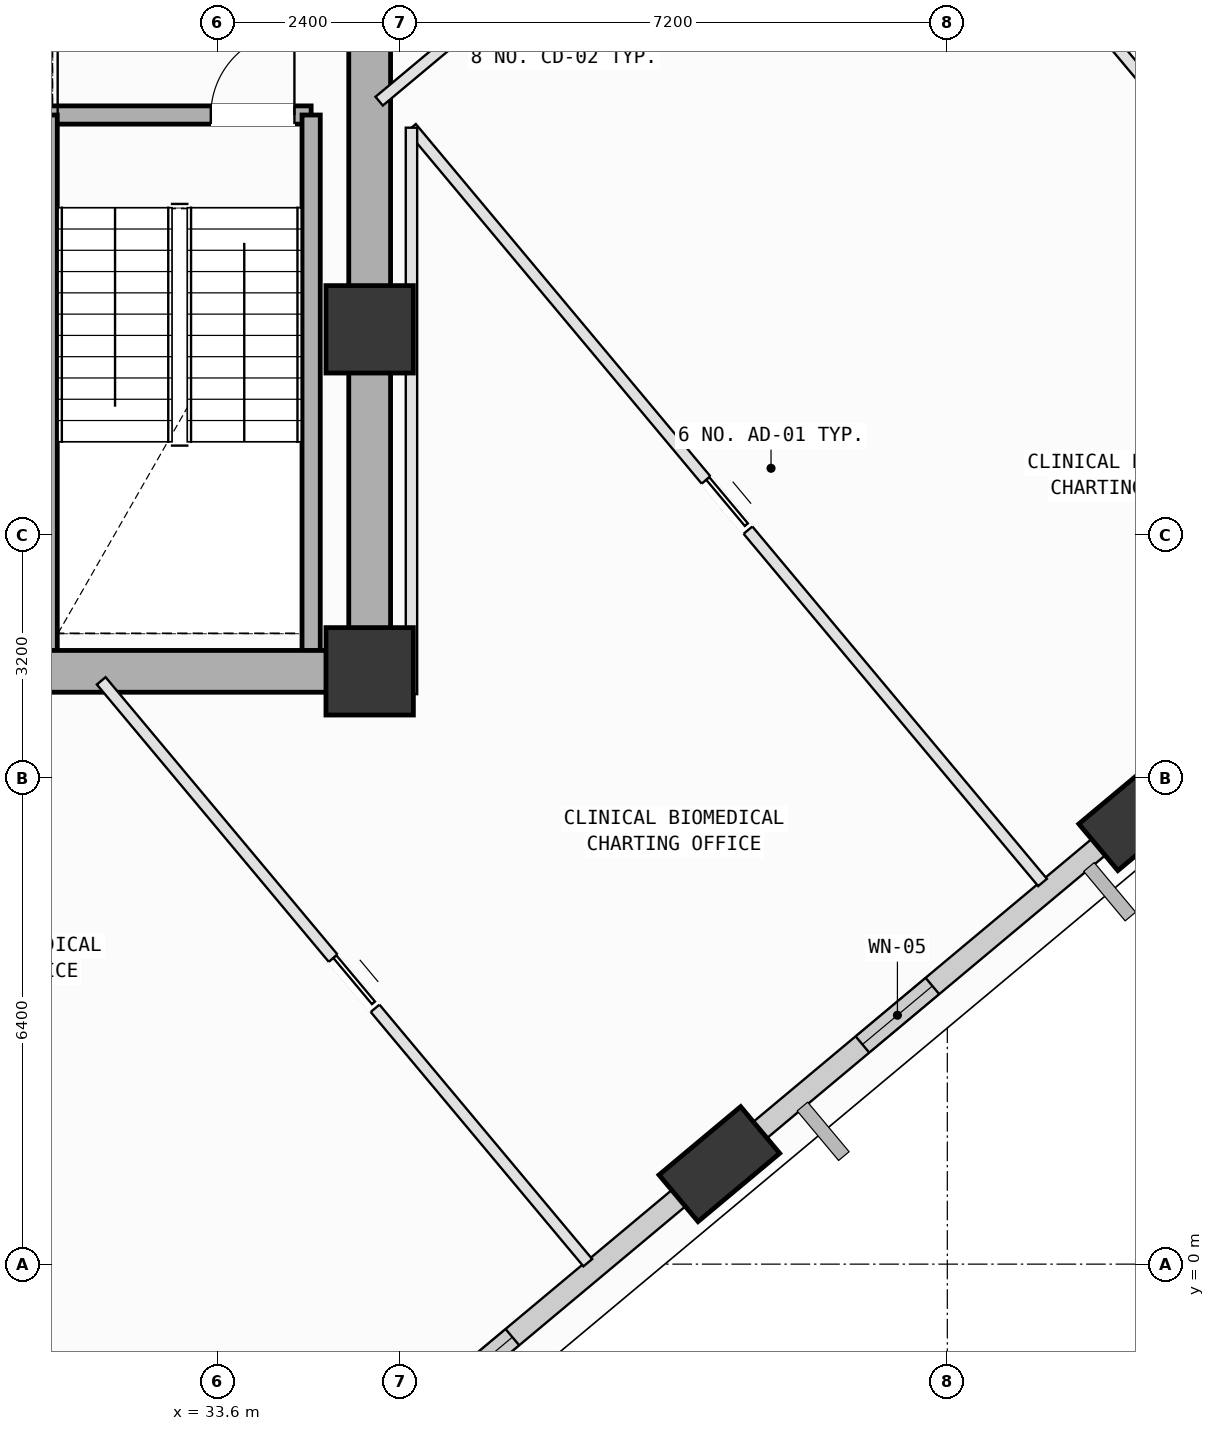
"""IFC4 building model, lengths in metres.
Left out: names, types, materials, properties, quantities, classifications, styles, units other than length and angle.
Written with IfcOpenShell. Run it as: python <this file> out.ifc"""

import sys

from ifc_helpers import new_model, si_unit, direction, frame, frame_2d, origin, origin_2d, place, context, subcontext, project, spatial, rectangle, extrude, element, fill, save


model = new_model("IFC4")
c1 = context("Model", 3, precision=1e-05, world=origin(), true_north=direction((0.0, 1.0)))
c2 = subcontext(c1, "Body", "Model", "MODEL_VIEW")
j1 = project(units=[si_unit("LENGTHUNIT", "METRE"), si_unit("PLANEANGLEUNIT", "RADIAN")], contexts=[c1])
p1 = place(None, origin())
s1 = spatial("IfcSite", under=j1, at=p1, CompositionType="ELEMENT")
p2 = place(p1, origin())
s2 = spatial("IfcBuilding", under=s1, at=p2, CompositionType="ELEMENT")
p3 = place(p2, frame((0.0, 0.0, 193.8)))
s3 = spatial("IfcBuildingStorey", under=s2, at=p3, CompositionType="ELEMENT", Elevation=193.8)
for number, where, z_axis, x_axis in (
    (1, (35.6, 7.8, 0.0), (0.0, 0.0, 1.0), (1.0, 0.0, 0.0)),
    (2, (35.6, 12.3, 0.0), (0.0, 0.0, 1.0), (1.0, 0.0, 0.0)),
):
    element("IfcColumn", number, at=place(p3, frame(where, z_axis=z_axis, x_axis=x_axis)), inside=s3, PredefinedType="COLUMN", context=c2, shape_type="SweptSolid", body=[
        extrude(rectangle(XDim=1.15, YDim=1.15, at=origin_2d()), origin(), (0.0, 0.0, 1.0), 4.0),
    ])
p4 = place(p3, frame((40.201, 1.316, 0.002), z_axis=(0.096641843147, 0.028020056409, 0.994924736144), x_axis=(-0.826582032204, 0.559103058849, 0.064543889124)))
e3 = element("IfcColumn", 3, at=p4, inside=s3, PredefinedType="COLUMN", context=c2, shape_type="SweptSolid", body=[
    extrude(rectangle(XDim=1.4, YDim=0.8, at=origin_2d()), origin(), (0.0, 0.0, 1.0), 4.017),
])
p5 = place(p3, frame((45.724, 5.935, 0.002), z_axis=(0.077435241864, 0.050670507834, 0.995708934857), x_axis=(-0.954505911001, 0.292223987972, 0.05935997573)))
e4 = element("IfcColumn", 4, at=p5, inside=s3, PredefinedType="COLUMN", context=c2, shape_type="SweptSolid", body=[
    extrude(rectangle(XDim=1.4, YDim=0.8, at=origin_2d()), origin(), (0.0, 0.0, 1.0), 4.014),
])
p6 = place(p3, frame((39.967, 1.121, 0.0), z_axis=(0.0, 0.0, 1.0), x_axis=(-0.767160959211, -0.641454645834, 0.0)))
e5 = element("IfcWall", 5, at=p6, inside=s3, PredefinedType="SOLIDWALL", context=c2, shape_type="SweptSolid", body=[
    extrude(rectangle(XDim=6.234, YDim=0.28, at=frame_2d((3.117, 0.0))), origin(), (0.0, 0.0, 1.0), 3.265),
])
p7 = place(p6, frame((3.245, 0.0, 0.75)))
e6 = element("IfcOpeningElement", 6, at=p7, cuts=e5, PredefinedType="OPENING", context=c2, shape_type="SweptSolid", body=[
    extrude(rectangle(XDim=1.8, YDim=2.05, at=frame_2d((0.9, 1.025))), frame((0.0, 0.15, 0.0), z_axis=(0.0, -1.0, 0.0), x_axis=(1.0, 0.0, 0.0)), (0.0, 0.0, 1.0), 0.3),
])
p8 = place(p3, frame((45.486, 5.735, 0.0), z_axis=(0.0, 0.0, 1.0), x_axis=(-0.767147873107, -0.641470296107, 0.0)))
e7 = element("IfcWall", 7, at=p8, inside=s3, PredefinedType="SOLIDWALL", context=c2, shape_type="SweptSolid", body=[
    extrude(rectangle(XDim=6.214, YDim=0.28, at=frame_2d((3.107, 0.0))), origin(), (0.0, 0.0, 1.0), 3.265),
])
p9 = place(p8, frame((3.235, 0.0, 0.75)))
e8 = element("IfcOpeningElement", 8, at=p9, cuts=e7, PredefinedType="OPENING", context=c2, shape_type="SweptSolid", body=[
    extrude(rectangle(XDim=1.2, YDim=1.75, at=frame_2d((0.6, 0.875))), frame((0.0, 0.15, 0.0), z_axis=(0.0, -1.0, 0.0), x_axis=(1.0, 0.0, 0.0)), (0.0, 0.0, 1.0), 0.3),
])
p10 = place(p3, frame((31.37, 15.12, 0.0), z_axis=(0.0, 0.0, 1.0), x_axis=(1.0, 0.0, 0.0)))
e9 = element("IfcWall", 9, at=p10, inside=s3, PredefinedType="SOLIDWALL", context=c2, shape_type="SweptSolid", body=[
    extrude(rectangle(XDim=3.46, YDim=0.24, at=frame_2d((1.73, 0.0))), origin(), (0.0, 0.0, 1.0), 3.78),
])
p11 = place(p10, frame((2.14, 0.0, 0.0)))
e10 = element("IfcOpeningElement", 10, at=p11, cuts=e9, PredefinedType="OPENING", context=c2, shape_type="SweptSolid", body=[
    extrude(rectangle(XDim=1.1, YDim=2.15, at=frame_2d((0.55, 1.075))), frame((0.0, 0.13, 0.0), z_axis=(0.0, -1.0, 0.0), x_axis=(1.0, 0.0, 0.0)), (0.0, 0.0, 1.0), 0.26),
])
for number, where, z_axis, x_axis in (
    (11, (34.83, 15.12, 0.0), (0.0, 0.0, 1.0), (0.0, -1.0, 0.0)),
    (12, (31.37, 8.075, 0.0), (0.0, 0.0, 1.0), (0.0, 1.0, 0.0)),
):
    element("IfcWall", number, at=place(p3, frame(where, z_axis=z_axis, x_axis=x_axis)), inside=s3, PredefinedType="SOLIDWALL", context=c2, shape_type="SweptSolid", body=[
        extrude(rectangle(XDim=7.045, YDim=0.24, at=frame_2d((3.522, 0.0))), origin(), (0.0, 0.0, 1.0), 3.78),
    ])
p12 = place(p3, frame((24.8, 7.8, 0.0), z_axis=(0.0, 0.0, 1.0), x_axis=(1.0, 0.0, 0.0)))
e13 = element("IfcWall", 13, at=p12, inside=s3, PredefinedType="SHEAR", context=c2, shape_type="SweptSolid", body=[
    extrude(rectangle(XDim=10.8, YDim=0.55, at=frame_2d((5.4, 0.0))), origin(), (0.0, 0.0, 1.0), 3.78),
])
p13 = place(p3, frame((35.6, 7.8, 0.0), z_axis=(0.0, 0.0, 1.0), x_axis=(0.0, 1.0, 0.0)))
e14 = element("IfcWall", 14, at=p13, inside=s3, PredefinedType="SHEAR", context=c2, shape_type="SweptSolid", body=[
    extrude(rectangle(XDim=9.0, YDim=0.55, at=frame_2d((4.5, 0.0))), origin(), (0.0, 0.0, 1.0), 3.78),
])
p14 = place(p3, frame((23.836, 5.361, 0.0), z_axis=(0.0, 0.0, 1.0), x_axis=(0.641422910141, -0.767187493606, 0.0)))
e15 = element("IfcWall", 15, at=p14, inside=s3, PredefinedType="PARTITIONING", context=c2, shape_type="SweptSolid", body=[
    extrude(rectangle(XDim=13.486, YDim=0.15, at=frame_2d((6.743, 0.0))), origin(), (0.0, 0.0, 1.0), 3.78),
])
p15 = place(p14, frame((6.313, 0.0, 0.0)))
e16 = element("IfcOpeningElement", 16, at=p15, cuts=e15, PredefinedType="OPENING", context=c2, shape_type="SweptSolid", body=[
    extrude(rectangle(XDim=0.86, YDim=2.06, at=frame_2d((0.43, 1.03))), frame((0.0, 0.085, 0.0), z_axis=(0.0, -1.0, 0.0), x_axis=(1.0, 0.0, 0.0)), (0.0, 0.0, 1.0), 0.17),
])
p16 = place(p3, frame((32.068, 7.675, 0.0), z_axis=(0.0, 0.0, 1.0), x_axis=(0.641475635529, -0.767143408381, 0.0)))
e17 = element("IfcWall", 17, at=p16, inside=s3, PredefinedType="PARTITIONING", context=c2, shape_type="SweptSolid", body=[
    extrude(rectangle(XDim=9.98, YDim=0.15, at=frame_2d((4.99, 0.0))), origin(), (0.0, 0.0, 1.0), 3.78),
])
p17 = place(p16, frame((4.757, 0.0, 0.0)))
e18 = element("IfcOpeningElement", 18, at=p17, cuts=e17, PredefinedType="OPENING", context=c2, shape_type="SweptSolid", body=[
    extrude(rectangle(XDim=0.86, YDim=2.06, at=frame_2d((0.43, 1.03))), frame((0.0, 0.085, 0.0), z_axis=(0.0, -1.0, 0.0), x_axis=(1.0, 0.0, 0.0)), (0.0, 0.0, 1.0), 0.17),
])
p18 = place(p3, frame((36.15, 14.953, 0.0), z_axis=(0.0, 0.0, 1.0), x_axis=(0.641424642923, -0.767186044875, 0.0)))
e19 = element("IfcWall", 19, at=p18, inside=s3, PredefinedType="PARTITIONING", context=c2, shape_type="SweptSolid", body=[
    extrude(rectangle(XDim=12.945, YDim=0.15, at=frame_2d((6.472, 0.0))), origin(), (0.0, 0.0, 1.0), 3.78),
])
p19 = place(p18, frame((6.042, 0.0, 0.0)))
e20 = element("IfcOpeningElement", 20, at=p19, cuts=e19, PredefinedType="OPENING", context=c2, shape_type="SweptSolid", body=[
    extrude(rectangle(XDim=0.86, YDim=2.06, at=frame_2d((0.43, 1.03))), frame((0.0, 0.085, 0.0), z_axis=(0.0, -1.0, 0.0), x_axis=(1.0, 0.0, 0.0)), (0.0, 0.0, 1.0), 0.17),
])
p20 = place(p3, frame((40.866, 1.572, 0.0), z_axis=(0.0, 0.0, 1.0), x_axis=(-0.767157200242, -0.641459141425, 0.0)))
e21 = element("IfcWall", 21, at=p20, inside=s3, PredefinedType="PARTITIONING", context=c2, shape_type="SweptSolid", body=[
    extrude(rectangle(XDim=0.979, YDim=0.15, at=frame_2d((0.49, 0.0))), origin(), (0.0, 0.0, 1.0), 3.265),
])
p21 = place(p3, frame((35.6, 7.5, 0.0), z_axis=(0.0, 0.0, 1.0), x_axis=(1.0, 0.0, 0.0)))
e22 = element("IfcWall", 22, at=p21, inside=s3, PredefinedType="PARTITIONING", context=c2, shape_type="SweptSolid", body=[
    extrude(rectangle(XDim=0.55, YDim=0.15, at=frame_2d((0.275, 0.0))), origin(), (0.0, 0.0, 1.0), 3.78),
])
p22 = place(p3, frame((36.15, 7.5, 0.0), z_axis=(0.0, 0.0, 1.0), x_axis=(0.0, 1.0, 0.0)))
e23 = element("IfcWall", 23, at=p22, inside=s3, PredefinedType="PARTITIONING", context=c2, shape_type="SweptSolid", body=[
    extrude(rectangle(XDim=7.453, YDim=0.15, at=frame_2d((3.727, 0.0))), origin(), (0.0, 0.0, 1.0), 3.78),
])
p23 = place(p3, frame((41.82, 20.333, 0.0), z_axis=(0.0, 0.0, 1.0), x_axis=(0.641441854708, -0.767171654213, 0.0)))
e24 = element("IfcWall", 24, at=p23, inside=s3, PredefinedType="PARTITIONING", context=c2, shape_type="SweptSolid", body=[
    extrude(rectangle(XDim=13.435, YDim=0.15, at=frame_2d((6.718, 0.0))), origin(), (0.0, 0.0, 1.0), 3.78),
])
p24 = place(p3, frame((46.394, 6.194, 0.0), z_axis=(0.0, 0.0, 1.0), x_axis=(-0.767312502054, -0.641273361518, 0.0)))
e25 = element("IfcWall", 25, at=p24, inside=s3, PredefinedType="PARTITIONING", context=c2, shape_type="SweptSolid", body=[
    extrude(rectangle(XDim=0.992, YDim=0.15, at=frame_2d((0.496, 0.0))), origin(), (0.0, 0.0, 1.0), 3.265),
])
p25 = place(p3, frame((35.725, 15.302, 0.0), z_axis=(0.0, 0.0, 1.0), x_axis=(0.767249700724, 0.641348498664, 0.0)))
e26 = element("IfcWall", 26, at=p25, inside=s3, PredefinedType="PARTITIONING", context=c2, shape_type="SweptSolid", body=[
    extrude(rectangle(XDim=4.082, YDim=0.15, at=frame_2d((2.041, 0.0))), origin(), (0.0, 0.0, 1.0), 3.78),
])
p26 = place(p25, frame((1.902, 0.0, 0.0)))
e27 = element("IfcOpeningElement", 27, at=p26, cuts=e26, PredefinedType="OPENING", context=c2, shape_type="SweptSolid", body=[
    extrude(rectangle(XDim=1.2, YDim=2.15, at=frame_2d((0.6, 1.075))), frame((0.0, 0.085, 0.0), z_axis=(0.0, -1.0, 0.0), x_axis=(1.0, 0.0, 0.0)), (0.0, 0.0, 1.0), 0.17),
])
p27 = place(p7, origin())
e28 = element("IfcWindow", 28, at=p27, inside=s3, PartitioningType="SINGLE_PANEL", PredefinedType="WINDOW", context=c2, shape_type="SweptSolid", body=[
    extrude(rectangle(XDim=1.8, YDim=2.05, at=frame_2d((0.9, 1.025))), frame((0.0, 0.03, 0.0), z_axis=(0.0, -1.0, 0.0), x_axis=(1.0, 0.0, 0.0)), (0.0, 0.0, 1.0), 0.06),
])
fill(e6, e28)
p28 = place(p9, origin())
e29 = element("IfcWindow", 29, at=p28, inside=s3, PartitioningType="SINGLE_PANEL", PredefinedType="WINDOW", context=c2, shape_type="SweptSolid", body=[
    extrude(rectangle(XDim=1.2, YDim=1.75, at=frame_2d((0.6, 0.875))), frame((0.0, 0.03, 0.0), z_axis=(0.0, -1.0, 0.0), x_axis=(1.0, 0.0, 0.0)), (0.0, 0.0, 1.0), 0.06),
])
fill(e8, e29)
p29 = place(p11, origin())
e30 = element("IfcDoor", 30, at=p29, inside=s3, OperationType="SINGLE_SWING_RIGHT", PredefinedType="DOOR", context=c2, shape_type="SweptSolid", body=[
    extrude(rectangle(XDim=1.1, YDim=2.15, at=frame_2d((0.55, 1.075))), frame((0.0, 0.025, 0.0), z_axis=(0.0, -1.0, 0.0), x_axis=(1.0, 0.0, 0.0)), (0.0, 0.0, 1.0), 0.05),
])
fill(e10, e30)
p30 = place(p19, origin())
e31 = element("IfcDoor", 31, at=p30, inside=s3, OperationType="SLIDING_TO_LEFT", PredefinedType="DOOR", context=c2, shape_type="SweptSolid", body=[
    extrude(rectangle(XDim=0.86, YDim=2.06, at=frame_2d((0.43, 1.03))), frame((0.0, 0.025, 0.0), z_axis=(0.0, -1.0, 0.0), x_axis=(1.0, 0.0, 0.0)), (0.0, 0.0, 1.0), 0.05),
])
fill(e20, e31)
p31 = place(p17, origin())
e32 = element("IfcDoor", 32, at=p31, inside=s3, OperationType="SLIDING_TO_LEFT", PredefinedType="DOOR", context=c2, shape_type="SweptSolid", body=[
    extrude(rectangle(XDim=0.86, YDim=2.06, at=frame_2d((0.43, 1.03))), frame((0.0, 0.025, 0.0), z_axis=(0.0, -1.0, 0.0), x_axis=(1.0, 0.0, 0.0)), (0.0, 0.0, 1.0), 0.05),
])
fill(e18, e32)
save(model, sys.argv[1])
